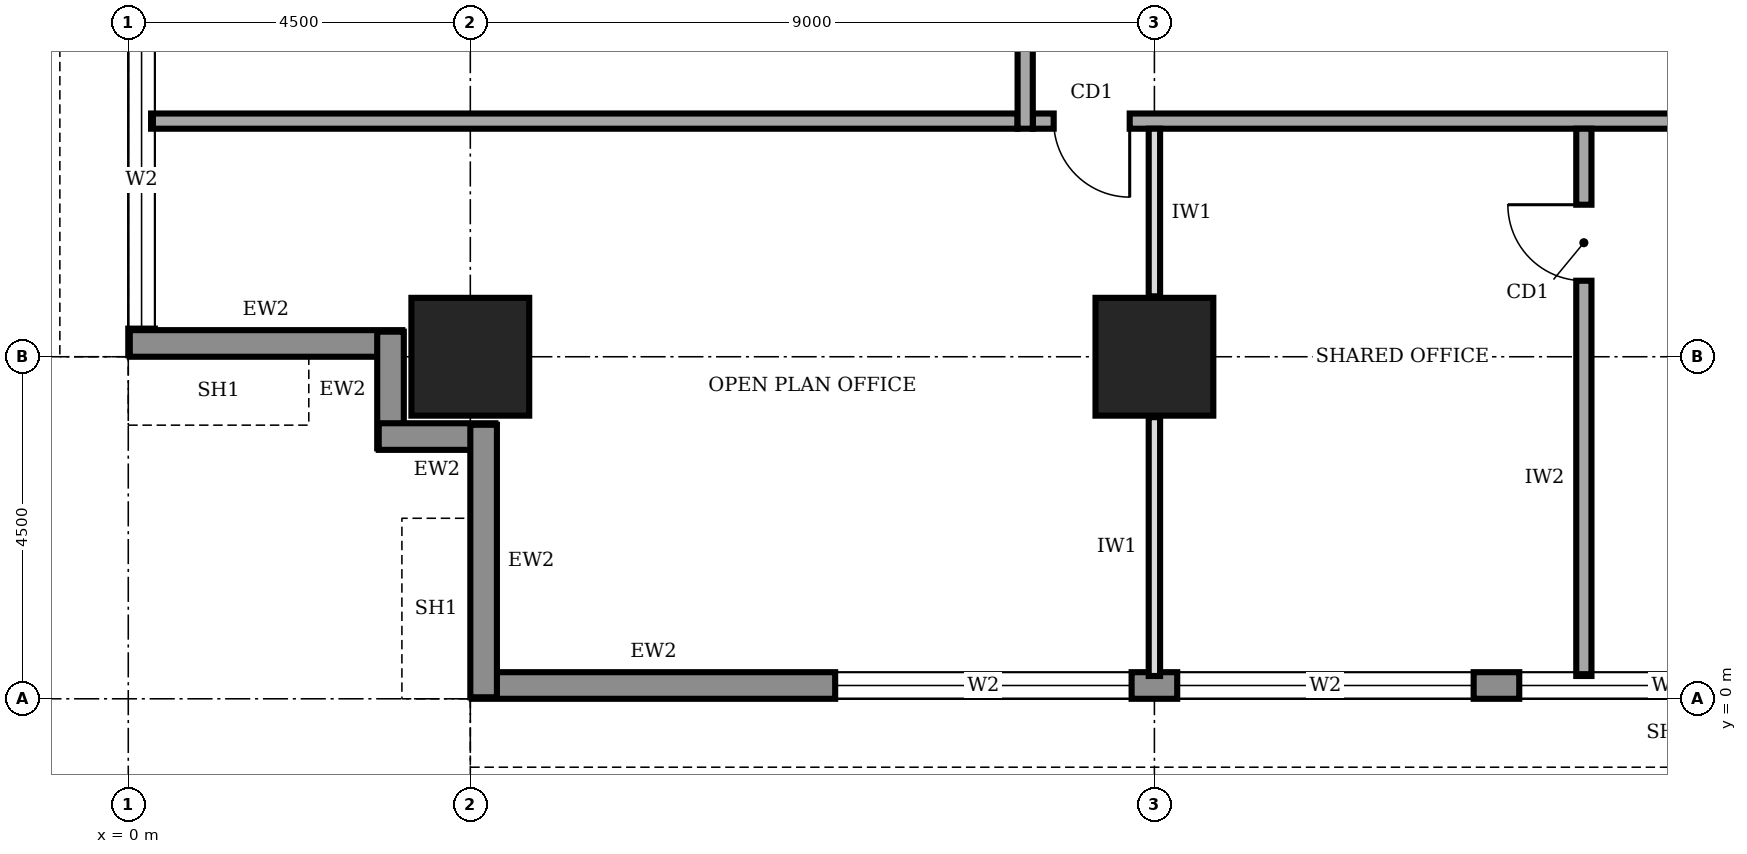
"""IFC4 building model, lengths in metres.
Left out: names, types, materials, properties, quantities, classifications, styles, units other than length and angle.
Written with IfcOpenShell. Run it as: python <this file> out.ifc"""

import sys

from ifc_helpers import new_model, si_unit, direction, frame, frame_2d, origin, origin_2d, place, context, subcontext, project, spatial, rectangle, extrude, element, fill, save


model = new_model("IFC4")
c1 = context("Model", 3, precision=1e-05, world=origin(), true_north=direction((0.0, 1.0)))
c2 = subcontext(c1, "Body", "Model", "MODEL_VIEW")
j1 = project(units=[si_unit("LENGTHUNIT", "METRE"), si_unit("PLANEANGLEUNIT", "RADIAN")], contexts=[c1])
p1 = place(None, origin())
s1 = spatial("IfcSite", under=j1, at=p1, CompositionType="ELEMENT")
p2 = place(p1, origin())
s2 = spatial("IfcBuilding", under=s1, at=p2, CompositionType="ELEMENT")
p3 = place(p2, frame((0.0, 0.0, 241.0)))
s3 = spatial("IfcBuildingStorey", under=s2, at=p3, CompositionType="ELEMENT", Elevation=241.0)
for number, where, z_axis, x_axis in (
    (1, (4.5, 4.5, 0.0), (0.0, 0.0, 1.0), (1.0, 0.0, 0.0)),
    (2, (13.5, 4.5, 0.0), (0.0, 0.0, 1.0), (1.0, 0.0, 0.0)),
):
    element("IfcColumn", number, at=place(p3, frame(where, z_axis=z_axis, x_axis=x_axis)), inside=s3, PredefinedType="COLUMN", context=c2, shape_type="SweptSolid", body=[
        extrude(rectangle(XDim=1.55, YDim=1.55, at=origin_2d()), origin(), (0.0, 0.0, 1.0), 4.0),
    ])
p4 = place(p3, frame((4.52, 0.175, 0.0), z_axis=(0.0, 0.0, 1.0), x_axis=(1.0, 0.0, 0.0)))
e3 = element("IfcWall", 3, at=p4, inside=s3, PredefinedType="STANDARD", context=c2, shape_type="SweptSolid", body=[
    extrude(rectangle(XDim=31.46, YDim=0.35, at=frame_2d((15.73, 0.0))), origin(), (0.0, 0.0, 1.0), 3.75),
])
p5 = place(p4, frame((4.78, 0.0, 0.6)))
e4 = element("IfcOpeningElement", 4, at=p5, cuts=e3, PredefinedType="OPENING", context=c2, shape_type="SweptSolid", body=[
    extrude(rectangle(XDim=3.9, YDim=2.6, at=frame_2d((1.95, 1.3))), frame((0.0, 0.185, 0.0), z_axis=(0.0, -1.0, 0.0), x_axis=(1.0, 0.0, 0.0)), (0.0, 0.0, 1.0), 0.37),
])
p6 = place(p4, frame((9.28, 0.0, 0.6)))
e5 = element("IfcOpeningElement", 5, at=p6, cuts=e3, PredefinedType="OPENING", context=c2, shape_type="SweptSolid", body=[
    extrude(rectangle(XDim=3.9, YDim=2.6, at=frame_2d((1.95, 1.3))), frame((0.0, 0.185, 0.0), z_axis=(0.0, -1.0, 0.0), x_axis=(1.0, 0.0, 0.0)), (0.0, 0.0, 1.0), 0.37),
])
p7 = place(p4, frame((13.78, 0.0, 0.6)))
e6 = element("IfcOpeningElement", 6, at=p7, cuts=e3, PredefinedType="OPENING", context=c2, shape_type="SweptSolid", body=[
    extrude(rectangle(XDim=3.9, YDim=2.6, at=frame_2d((1.95, 1.3))), frame((0.0, 0.185, 0.0), z_axis=(0.0, -1.0, 0.0), x_axis=(1.0, 0.0, 0.0)), (0.0, 0.0, 1.0), 0.37),
])
p8 = place(p4, frame((18.28, 0.0, 0.6)))
e7 = element("IfcOpeningElement", 7, at=p8, cuts=e3, PredefinedType="OPENING", context=c2, shape_type="SweptSolid", body=[
    extrude(rectangle(XDim=3.9, YDim=2.6, at=frame_2d((1.95, 1.3))), frame((0.0, 0.185, 0.0), z_axis=(0.0, -1.0, 0.0), x_axis=(1.0, 0.0, 0.0)), (0.0, 0.0, 1.0), 0.37),
])
p9 = place(p4, frame((22.78, 0.0, 0.6)))
e8 = element("IfcOpeningElement", 8, at=p9, cuts=e3, PredefinedType="OPENING", context=c2, shape_type="SweptSolid", body=[
    extrude(rectangle(XDim=3.9, YDim=2.6, at=frame_2d((1.95, 1.3))), frame((0.0, 0.185, 0.0), z_axis=(0.0, -1.0, 0.0), x_axis=(1.0, 0.0, 0.0)), (0.0, 0.0, 1.0), 0.37),
])
p10 = place(p4, frame((27.21, 0.0, 0.6)))
e9 = element("IfcOpeningElement", 9, at=p10, cuts=e3, PredefinedType="OPENING", context=c2, shape_type="SweptSolid", body=[
    extrude(rectangle(XDim=3.9, YDim=2.6, at=frame_2d((1.95, 1.3))), frame((0.0, 0.185, 0.0), z_axis=(0.0, -1.0, 0.0), x_axis=(1.0, 0.0, 0.0)), (0.0, 0.0, 1.0), 0.37),
])
p11 = place(p3, frame((0.175, 35.98, 0.0), z_axis=(0.0, 0.0, 1.0), x_axis=(0.0, -1.0, 0.0)))
e10 = element("IfcWall", 10, at=p11, inside=s3, PredefinedType="STANDARD", context=c2, shape_type="SweptSolid", body=[
    extrude(rectangle(XDim=31.46, YDim=0.35, at=frame_2d((15.73, 0.0))), origin(), (0.0, 0.0, 1.0), 3.75),
])
p12 = place(p11, frame((27.21, 0.0, 0.6)))
e11 = element("IfcOpeningElement", 11, at=p12, cuts=e10, PredefinedType="OPENING", context=c2, shape_type="SweptSolid", body=[
    extrude(rectangle(XDim=3.9, YDim=2.6, at=frame_2d((1.95, 1.3))), frame((0.0, 0.185, 0.0), z_axis=(0.0, -1.0, 0.0), x_axis=(1.0, 0.0, 0.0)), (0.0, 0.0, 1.0), 0.37),
])
p13 = place(p11, frame((22.78, 0.0, 0.6)))
e12 = element("IfcOpeningElement", 12, at=p13, cuts=e10, PredefinedType="OPENING", context=c2, shape_type="SweptSolid", body=[
    extrude(rectangle(XDim=3.9, YDim=2.6, at=frame_2d((1.95, 1.3))), frame((0.0, 0.185, 0.0), z_axis=(0.0, -1.0, 0.0), x_axis=(1.0, 0.0, 0.0)), (0.0, 0.0, 1.0), 0.37),
])
p14 = place(p11, frame((18.28, 0.0, 0.6)))
e13 = element("IfcOpeningElement", 13, at=p14, cuts=e10, PredefinedType="OPENING", context=c2, shape_type="SweptSolid", body=[
    extrude(rectangle(XDim=3.9, YDim=2.6, at=frame_2d((1.95, 1.3))), frame((0.0, 0.185, 0.0), z_axis=(0.0, -1.0, 0.0), x_axis=(1.0, 0.0, 0.0)), (0.0, 0.0, 1.0), 0.37),
])
p15 = place(p11, frame((13.78, 0.0, 0.6)))
e14 = element("IfcOpeningElement", 14, at=p15, cuts=e10, PredefinedType="OPENING", context=c2, shape_type="SweptSolid", body=[
    extrude(rectangle(XDim=3.9, YDim=2.6, at=frame_2d((1.95, 1.3))), frame((0.0, 0.185, 0.0), z_axis=(0.0, -1.0, 0.0), x_axis=(1.0, 0.0, 0.0)), (0.0, 0.0, 1.0), 0.37),
])
p16 = place(p11, frame((9.28, 0.0, 0.6)))
e15 = element("IfcOpeningElement", 15, at=p16, cuts=e10, PredefinedType="OPENING", context=c2, shape_type="SweptSolid", body=[
    extrude(rectangle(XDim=3.9, YDim=2.6, at=frame_2d((1.95, 1.3))), frame((0.0, 0.185, 0.0), z_axis=(0.0, -1.0, 0.0), x_axis=(1.0, 0.0, 0.0)), (0.0, 0.0, 1.0), 0.37),
])
p17 = place(p11, frame((4.78, 0.0, 0.6)))
e16 = element("IfcOpeningElement", 16, at=p17, cuts=e10, PredefinedType="OPENING", context=c2, shape_type="SweptSolid", body=[
    extrude(rectangle(XDim=3.9, YDim=2.6, at=frame_2d((1.95, 1.3))), frame((0.0, 0.185, 0.0), z_axis=(0.0, -1.0, 0.0), x_axis=(1.0, 0.0, 0.0)), (0.0, 0.0, 1.0), 0.37),
])
p18 = place(p3, frame((0.02, 4.675, 0.0), z_axis=(0.0, 0.0, 1.0), x_axis=(1.0, 0.0, 0.0)))
e17 = element("IfcWall", 17, at=p18, inside=s3, PredefinedType="STANDARD", context=c2, shape_type="SweptSolid", body=[
    extrude(rectangle(XDim=3.585, YDim=0.35, at=frame_2d((1.792, 0.0))), origin(), (0.0, 0.0, 1.0), 2.75),
])
for number, where, z_axis, x_axis in (
    (18, (3.45, 4.83, 0.0), (0.0, 0.0, 1.0), (0.0, -1.0, 0.0)),
    (19, (3.295, 3.45, 0.0), (0.0, 0.0, 1.0), (1.0, 0.0, 0.0)),
):
    element("IfcWall", number, at=place(p3, frame(where, z_axis=z_axis, x_axis=x_axis)), inside=s3, PredefinedType="STANDARD", context=c2, shape_type="SweptSolid", body=[
        extrude(rectangle(XDim=1.535, YDim=0.35, at=frame_2d((0.768, 0.0))), origin(), (0.0, 0.0, 1.0), 3.75),
    ])
p19 = place(p3, frame((4.675, 3.605, 0.0), z_axis=(0.0, 0.0, 1.0), x_axis=(0.0, -1.0, 0.0)))
e20 = element("IfcWall", 20, at=p19, inside=s3, PredefinedType="STANDARD", context=c2, shape_type="SweptSolid", body=[
    extrude(rectangle(XDim=3.585, YDim=0.35, at=frame_2d((1.792, 0.0))), origin(), (0.0, 0.0, 1.0), 2.75),
])
p20 = place(p3, frame((11.9, 7.6, 0.0), z_axis=(0.0, 0.0, 1.0), x_axis=(1.0, 0.0, 0.0)))
e21 = element("IfcWall", 21, at=p20, inside=s3, PredefinedType="SOLIDWALL", context=c2, shape_type="SweptSolid", body=[
    extrude(rectangle(XDim=16.9, YDim=0.2, at=frame_2d((8.45, 0.0))), origin(), (0.0, 0.0, 1.0), 3.75),
])
p21 = place(p20, frame((0.275, 0.0, 0.0)))
e22 = element("IfcOpeningElement", 22, at=p21, cuts=e21, PredefinedType="OPENING", context=c2, shape_type="SweptSolid", body=[
    extrude(rectangle(XDim=1.0, YDim=2.1, at=frame_2d((0.5, 1.05))), frame((0.0, 0.11, 0.0), z_axis=(0.0, -1.0, 0.0), x_axis=(1.0, 0.0, 0.0)), (0.0, 0.0, 1.0), 0.22),
])
p22 = place(p3, frame((11.8, 32.8, 0.0), z_axis=(0.0, 0.0, 1.0), x_axis=(0.0, -1.0, 0.0)))
e23 = element("IfcWall", 23, at=p22, inside=s3, PredefinedType="SOLIDWALL", context=c2, shape_type="SweptSolid", body=[
    extrude(rectangle(XDim=25.3, YDim=0.2, at=frame_2d((12.65, 0.0))), origin(), (0.0, 0.0, 1.0), 3.75),
])
p23 = place(p22, frame((21.8, 0.0, 0.0)))
e24 = element("IfcOpeningElement", 24, at=p23, cuts=e23, PredefinedType="OPENING", context=c2, shape_type="SweptSolid", body=[
    extrude(rectangle(XDim=1.0, YDim=2.1, at=frame_2d((0.5, 1.05))), frame((0.0, 0.11, 0.0), z_axis=(0.0, -1.0, 0.0), x_axis=(1.0, 0.0, 0.0)), (0.0, 0.0, 1.0), 0.22),
])
p24 = place(p22, frame((17.65, 0.0, 0.0)))
e25 = element("IfcOpeningElement", 25, at=p24, cuts=e23, PredefinedType="OPENING", context=c2, shape_type="SweptSolid", body=[
    extrude(rectangle(XDim=0.9, YDim=2.1, at=frame_2d((0.45, 1.05))), frame((0.0, 0.11, 0.0), z_axis=(0.0, -1.0, 0.0), x_axis=(1.0, 0.0, 0.0)), (0.0, 0.0, 1.0), 0.22),
])
p25 = place(p22, frame((14.45, 0.0, 0.0)))
e26 = element("IfcOpeningElement", 26, at=p25, cuts=e23, PredefinedType="OPENING", context=c2, shape_type="SweptSolid", body=[
    extrude(rectangle(XDim=0.9, YDim=2.1, at=frame_2d((0.45, 1.05))), frame((0.0, 0.11, 0.0), z_axis=(0.0, -1.0, 0.0), x_axis=(1.0, 0.0, 0.0)), (0.0, 0.0, 1.0), 0.22),
])
p26 = place(p22, frame((8.9, 0.0, 0.0)))
e27 = element("IfcOpeningElement", 27, at=p26, cuts=e23, PredefinedType="OPENING", context=c2, shape_type="SweptSolid", body=[
    extrude(rectangle(XDim=0.9, YDim=2.1, at=frame_2d((0.45, 1.05))), frame((0.0, 0.11, 0.0), z_axis=(0.0, -1.0, 0.0), x_axis=(1.0, 0.0, 0.0)), (0.0, 0.0, 1.0), 0.22),
])
p27 = place(p22, frame((6.3, 0.0, 0.0)))
e28 = element("IfcOpeningElement", 28, at=p27, cuts=e23, PredefinedType="OPENING", context=c2, shape_type="SweptSolid", body=[
    extrude(rectangle(XDim=1.0, YDim=2.1, at=frame_2d((0.5, 1.05))), frame((0.0, 0.11, 0.0), z_axis=(0.0, -1.0, 0.0), x_axis=(1.0, 0.0, 0.0)), (0.0, 0.0, 1.0), 0.22),
])
p28 = place(p22, frame((11.4, 0.0, 0.0)))
e29 = element("IfcOpeningElement", 29, at=p28, cuts=e23, PredefinedType="OPENING", context=c2, shape_type="SweptSolid", body=[
    extrude(rectangle(XDim=1.0, YDim=2.1, at=frame_2d((0.5, 1.05))), frame((0.0, 0.11, 0.0), z_axis=(0.0, -1.0, 0.0), x_axis=(1.0, 0.0, 0.0)), (0.0, 0.0, 1.0), 0.22),
])
p29 = place(p22, frame((2.3, 0.0, 0.0)))
e30 = element("IfcOpeningElement", 30, at=p29, cuts=e23, PredefinedType="OPENING", context=c2, shape_type="SweptSolid", body=[
    extrude(rectangle(XDim=1.0, YDim=2.1, at=frame_2d((0.5, 1.05))), frame((0.0, 0.11, 0.0), z_axis=(0.0, -1.0, 0.0), x_axis=(1.0, 0.0, 0.0)), (0.0, 0.0, 1.0), 0.22),
])
p30 = place(p3, frame((19.15, 0.3, 0.0), z_axis=(0.0, 0.0, 1.0), x_axis=(0.0, 1.0, 0.0)))
e31 = element("IfcWall", 31, at=p30, inside=s3, PredefinedType="SOLIDWALL", context=c2, shape_type="SweptSolid", body=[
    extrude(rectangle(XDim=7.2, YDim=0.2, at=frame_2d((3.6, 0.0))), origin(), (0.0, 0.0, 1.0), 3.75),
])
p31 = place(p30, frame((5.2, 0.0, 0.0)))
e32 = element("IfcOpeningElement", 32, at=p31, cuts=e31, PredefinedType="OPENING", context=c2, shape_type="SweptSolid", body=[
    extrude(rectangle(XDim=1.0, YDim=2.1, at=frame_2d((0.5, 1.05))), frame((0.0, 0.11, 0.0), z_axis=(0.0, -1.0, 0.0), x_axis=(1.0, 0.0, 0.0)), (0.0, 0.0, 1.0), 0.22),
])
p32 = place(p3, frame((0.3, 7.6, 0.0), z_axis=(0.0, 0.0, 1.0), x_axis=(1.0, 0.0, 0.0)))
e33 = element("IfcWall", 33, at=p32, inside=s3, PredefinedType="SOLIDWALL", context=c2, shape_type="SweptSolid", body=[
    extrude(rectangle(XDim=11.4, YDim=0.2, at=frame_2d((5.7, 0.0))), origin(), (0.0, 0.0, 1.0), 3.75),
])
p33 = place(p3, frame((13.5, 0.3, 0.0), z_axis=(0.0, 0.0, 1.0), x_axis=(0.0, 1.0, 0.0)))
e34 = element("IfcWall", 34, at=p33, inside=s3, PredefinedType="PARTITIONING", context=c2, shape_type="SweptSolid", body=[
    extrude(rectangle(XDim=3.405, YDim=0.15, at=frame_2d((1.703, 0.0))), origin(), (0.0, 0.0, 1.0), 2.75),
])
p34 = place(p3, frame((13.5, 5.295, 0.0), z_axis=(0.0, 0.0, 1.0), x_axis=(0.0, 1.0, 0.0)))
e35 = element("IfcWall", 35, at=p34, inside=s3, PredefinedType="PARTITIONING", context=c2, shape_type="SweptSolid", body=[
    extrude(rectangle(XDim=2.205, YDim=0.15, at=frame_2d((1.103, 0.0))), origin(), (0.0, 0.0, 1.0), 3.75),
])
p35 = place(p5, origin())
e36 = element("IfcWindow", 36, at=p35, inside=s3, PartitioningType="SINGLE_PANEL", PredefinedType="WINDOW", context=c2, shape_type="SweptSolid", body=[
    extrude(rectangle(XDim=3.9, YDim=2.6, at=frame_2d((1.95, 1.3))), frame((0.0, 0.03, 0.0), z_axis=(0.0, -1.0, 0.0), x_axis=(1.0, 0.0, 0.0)), (0.0, 0.0, 1.0), 0.06),
])
fill(e4, e36)
p36 = place(p6, origin())
e37 = element("IfcWindow", 37, at=p36, inside=s3, PartitioningType="SINGLE_PANEL", PredefinedType="WINDOW", context=c2, shape_type="SweptSolid", body=[
    extrude(rectangle(XDim=3.9, YDim=2.6, at=frame_2d((1.95, 1.3))), frame((0.0, 0.03, 0.0), z_axis=(0.0, -1.0, 0.0), x_axis=(1.0, 0.0, 0.0)), (0.0, 0.0, 1.0), 0.06),
])
fill(e5, e37)
p37 = place(p7, origin())
e38 = element("IfcWindow", 38, at=p37, inside=s3, PartitioningType="SINGLE_PANEL", PredefinedType="WINDOW", context=c2, shape_type="SweptSolid", body=[
    extrude(rectangle(XDim=3.9, YDim=2.6, at=frame_2d((1.95, 1.3))), frame((0.0, 0.03, 0.0), z_axis=(0.0, -1.0, 0.0), x_axis=(1.0, 0.0, 0.0)), (0.0, 0.0, 1.0), 0.06),
])
fill(e6, e38)
p38 = place(p12, origin())
e39 = element("IfcWindow", 39, at=p38, inside=s3, PartitioningType="SINGLE_PANEL", PredefinedType="WINDOW", context=c2, shape_type="SweptSolid", body=[
    extrude(rectangle(XDim=3.9, YDim=2.6, at=frame_2d((1.95, 1.3))), frame((0.0, 0.03, 0.0), z_axis=(0.0, -1.0, 0.0), x_axis=(1.0, 0.0, 0.0)), (0.0, 0.0, 1.0), 0.06),
])
fill(e11, e39)
p39 = place(p21, frame((1.0, 0.0, 0.0), z_axis=(0.0, 0.0, 1.0), x_axis=(-1.0, 0.0, 0.0)))
e40 = element("IfcDoor", 40, at=p39, inside=s3, OperationType="SINGLE_SWING_LEFT", PredefinedType="DOOR", context=c2, shape_type="SweptSolid", body=[
    extrude(rectangle(XDim=1.0, YDim=2.1, at=frame_2d((0.5, 1.05))), frame((0.0, 0.025, 0.0), z_axis=(0.0, -1.0, 0.0), x_axis=(1.0, 0.0, 0.0)), (0.0, 0.0, 1.0), 0.05),
])
fill(e22, e40)
p40 = place(p31, origin())
e41 = element("IfcDoor", 41, at=p40, inside=s3, OperationType="SINGLE_SWING_RIGHT", PredefinedType="DOOR", context=c2, shape_type="SweptSolid", body=[
    extrude(rectangle(XDim=1.0, YDim=2.1, at=frame_2d((0.5, 1.05))), frame((0.0, 0.025, 0.0), z_axis=(0.0, -1.0, 0.0), x_axis=(1.0, 0.0, 0.0)), (0.0, 0.0, 1.0), 0.05),
])
fill(e32, e41)
save(model, sys.argv[1])
